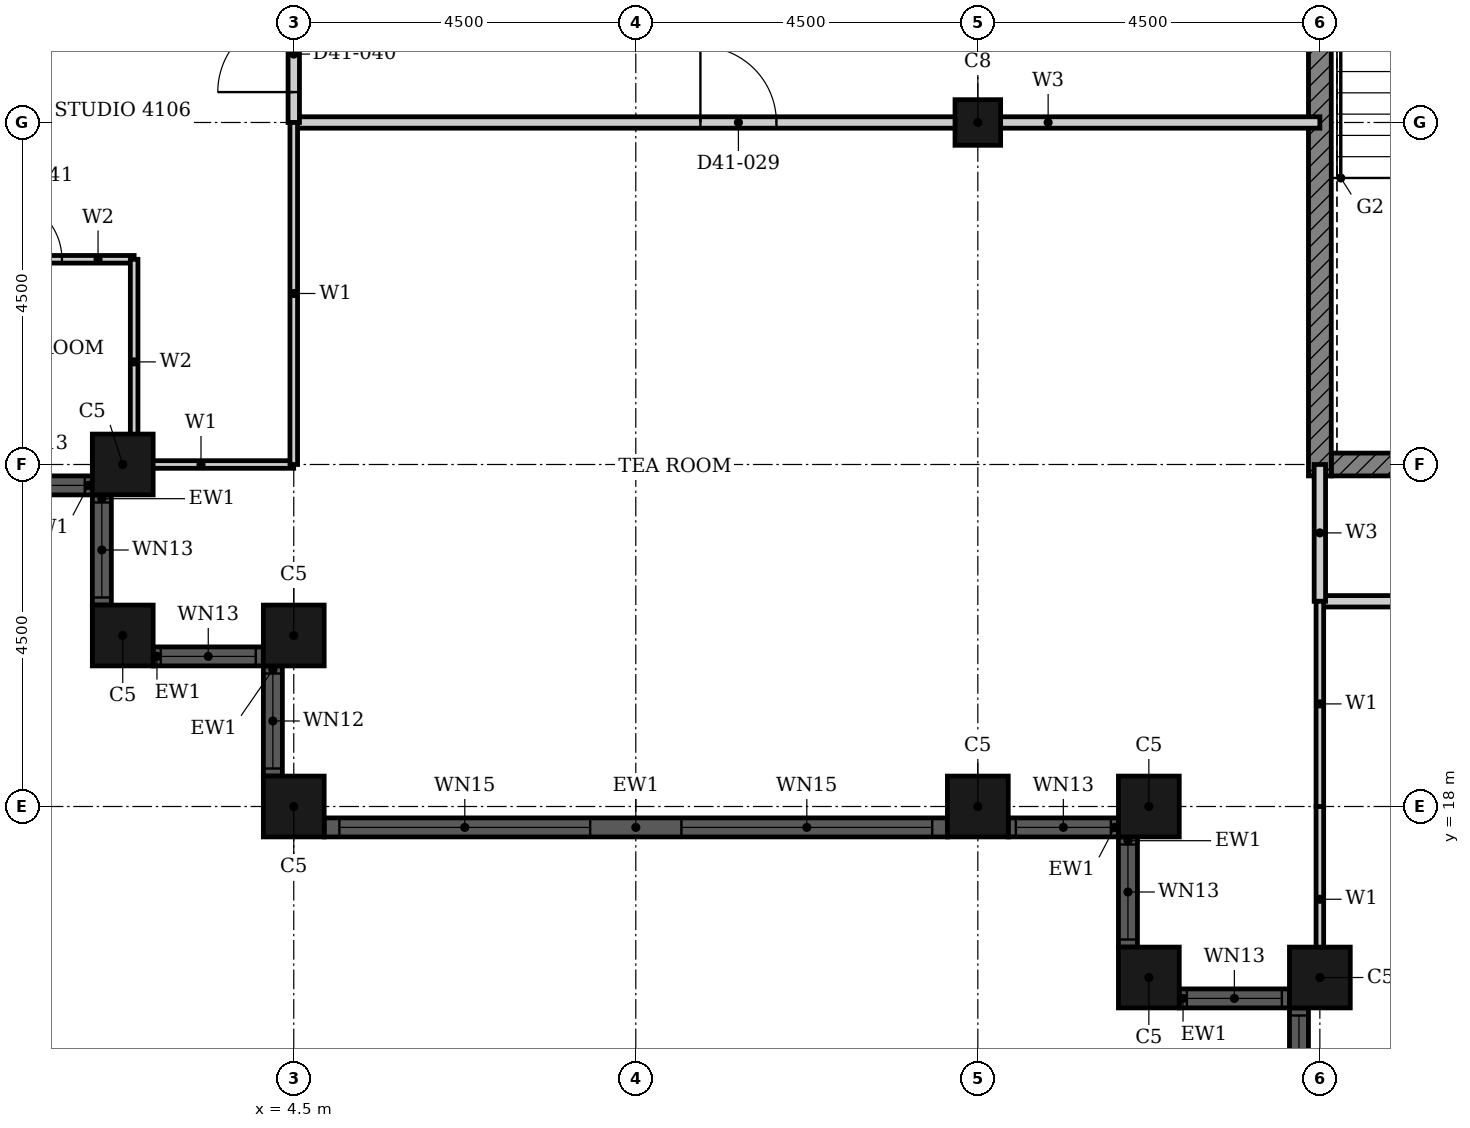
"""IFC4 building model, lengths in metres.
Left out: names, types, materials, properties, quantities, classifications, styles, units other than length and angle.
Written with IfcOpenShell. Run it as: python <this file> out.ifc"""

import sys

from ifc_helpers import new_model, si_unit, direction, frame, frame_2d, origin, origin_2d, place, context, subcontext, project, spatial, rectangle, hollow_rectangle, extrude, element, fill, save


model = new_model("IFC4")
c1 = context("Model", 3, precision=1e-05, world=origin(), true_north=direction((0.0, 1.0)))
c2 = subcontext(c1, "Body", "Model", "MODEL_VIEW")
j1 = project(units=[si_unit("LENGTHUNIT", "METRE"), si_unit("PLANEANGLEUNIT", "RADIAN")], contexts=[c1])
p1 = place(None, origin())
s1 = spatial("IfcSite", under=j1, at=p1, CompositionType="ELEMENT")
p2 = place(p1, origin())
s2 = spatial("IfcBuilding", under=s1, at=p2, CompositionType="ELEMENT")
p3 = place(p2, frame((0.0, 0.0, 165.4)))
s3 = spatial("IfcBuildingStorey", under=s2, at=p3, CompositionType="ELEMENT", Elevation=165.4)
for number, where, z_axis, x_axis in (
    (1, (2.25, 22.5, 0.0), (0.0, 0.0, 1.0), (1.0, 0.0, 0.0)),
    (2, (2.25, 20.25, 0.0), (0.0, 0.0, 1.0), (1.0, 0.0, 0.0)),
    (3, (4.5, 20.25, 0.0), (0.0, 0.0, 1.0), (1.0, 0.0, 0.0)),
    (4, (4.5, 18.0, 0.0), (0.0, 0.0, 1.0), (1.0, 0.0, 0.0)),
    (5, (13.5, 18.0, 0.0), (0.0, 0.0, 1.0), (1.0, 0.0, 0.0)),
    (6, (15.75, 18.0, 0.0), (0.0, 0.0, 1.0), (1.0, 0.0, 0.0)),
    (7, (15.75, 15.75, 0.0), (0.0, 0.0, 1.0), (1.0, 0.0, 0.0)),
    (8, (18.0, 15.75, 0.0), (0.0, 0.0, 1.0), (1.0, 0.0, 0.0)),
):
    element("IfcColumn", number, at=place(p3, frame(where, z_axis=z_axis, x_axis=x_axis)), inside=s3, PredefinedType="COLUMN", context=c2, shape_type="SweptSolid", body=[
        extrude(hollow_rectangle(XDim=0.8, YDim=0.8, WallThickness=0.025, at=origin_2d()), origin(), (0.0, 0.0, 1.0), 3.7),
    ])
p4 = place(p3, frame((13.5, 27.0, 0.0), z_axis=(0.0, 0.0, 1.0), x_axis=(1.0, 0.0, 0.0)))
e9 = element("IfcColumn", 9, at=p4, inside=s3, PredefinedType="COLUMN", context=c2, shape_type="SweptSolid", body=[
    extrude(hollow_rectangle(XDim=0.6, YDim=0.6, WallThickness=0.02, at=origin_2d()), origin(), (0.0, 0.0, 1.0), 3.7),
])
p5 = place(p3, frame((0.4, 22.225, 0.0), z_axis=(0.0, 0.0, 1.0), x_axis=(1.0, 0.0, 0.0)))
e10 = element("IfcWall", 10, at=p5, inside=s3, PredefinedType="SOLIDWALL", context=c2, shape_type="SweptSolid", body=[
    extrude(rectangle(XDim=1.45, YDim=0.25, at=frame_2d((0.725, 0.0))), origin(), (0.0, 0.0, 1.0), 3.7),
])
p6 = place(p5, frame((0.1, 0.0, 0.9)))
e11 = element("IfcOpeningElement", 11, at=p6, cuts=e10, PredefinedType="OPENING", context=c2, shape_type="SweptSolid", body=[
    extrude(rectangle(XDim=1.25, YDim=1.85, at=frame_2d((0.625, 0.925))), frame((0.0, 0.135, 0.0), z_axis=(0.0, -1.0, 0.0), x_axis=(1.0, 0.0, 0.0)), (0.0, 0.0, 1.0), 0.27),
])
p7 = place(p3, frame((1.975, 22.1, 0.0), z_axis=(0.0, 0.0, 1.0), x_axis=(0.0, -1.0, 0.0)))
e12 = element("IfcWall", 12, at=p7, inside=s3, PredefinedType="SOLIDWALL", context=c2, shape_type="SweptSolid", body=[
    extrude(rectangle(XDim=1.45, YDim=0.25, at=frame_2d((0.725, 0.0))), origin(), (0.0, 0.0, 1.0), 3.7),
])
p8 = place(p7, frame((0.1, 0.0, 0.9)))
e13 = element("IfcOpeningElement", 13, at=p8, cuts=e12, PredefinedType="OPENING", context=c2, shape_type="SweptSolid", body=[
    extrude(rectangle(XDim=1.25, YDim=1.85, at=frame_2d((0.625, 0.925))), frame((0.0, 0.135, 0.0), z_axis=(0.0, -1.0, 0.0), x_axis=(1.0, 0.0, 0.0)), (0.0, 0.0, 1.0), 0.27),
])
p9 = place(p3, frame((2.65, 19.975, 0.0), z_axis=(0.0, 0.0, 1.0), x_axis=(1.0, 0.0, 0.0)))
e14 = element("IfcWall", 14, at=p9, inside=s3, PredefinedType="SOLIDWALL", context=c2, shape_type="SweptSolid", body=[
    extrude(rectangle(XDim=1.45, YDim=0.25, at=frame_2d((0.725, 0.0))), origin(), (0.0, 0.0, 1.0), 3.7),
])
p10 = place(p9, frame((0.1, 0.0, 0.9)))
e15 = element("IfcOpeningElement", 15, at=p10, cuts=e14, PredefinedType="OPENING", context=c2, shape_type="SweptSolid", body=[
    extrude(rectangle(XDim=1.25, YDim=1.85, at=frame_2d((0.625, 0.925))), frame((0.0, 0.135, 0.0), z_axis=(0.0, -1.0, 0.0), x_axis=(1.0, 0.0, 0.0)), (0.0, 0.0, 1.0), 0.27),
])
p11 = place(p3, frame((4.225, 19.85, 0.0), z_axis=(0.0, 0.0, 1.0), x_axis=(0.0, -1.0, 0.0)))
e16 = element("IfcWall", 16, at=p11, inside=s3, PredefinedType="SOLIDWALL", context=c2, shape_type="SweptSolid", body=[
    extrude(rectangle(XDim=1.45, YDim=0.25, at=frame_2d((0.725, 0.0))), origin(), (0.0, 0.0, 1.0), 3.7),
])
p12 = place(p11, frame((0.1, 0.0, 0.9)))
e17 = element("IfcOpeningElement", 17, at=p12, cuts=e16, PredefinedType="OPENING", context=c2, shape_type="SweptSolid", body=[
    extrude(rectangle(XDim=1.25, YDim=2.08, at=frame_2d((0.625, 1.04))), frame((0.0, 0.135, 0.0), z_axis=(0.0, -1.0, 0.0), x_axis=(1.0, 0.0, 0.0)), (0.0, 0.0, 1.0), 0.27),
])
p13 = place(p3, frame((4.9, 17.725, 0.0), z_axis=(0.0, 0.0, 1.0), x_axis=(1.0, 0.0, 0.0)))
e18 = element("IfcWall", 18, at=p13, inside=s3, PredefinedType="SOLIDWALL", context=c2, shape_type="SweptSolid", body=[
    extrude(rectangle(XDim=8.2, YDim=0.25, at=frame_2d((4.1, 0.0))), origin(), (0.0, 0.0, 1.0), 3.7),
])
p14 = place(p13, frame((0.2, 0.0, 0.45)))
e19 = element("IfcOpeningElement", 19, at=p14, cuts=e18, PredefinedType="OPENING", context=c2, shape_type="SweptSolid", body=[
    extrude(rectangle(XDim=3.3, YDim=2.3, at=frame_2d((1.65, 1.15))), frame((0.0, 0.135, 0.0), z_axis=(0.0, -1.0, 0.0), x_axis=(1.0, 0.0, 0.0)), (0.0, 0.0, 1.0), 0.27),
])
p15 = place(p13, frame((4.7, 0.0, 0.45)))
e20 = element("IfcOpeningElement", 20, at=p15, cuts=e18, PredefinedType="OPENING", context=c2, shape_type="SweptSolid", body=[
    extrude(rectangle(XDim=3.3, YDim=2.3, at=frame_2d((1.65, 1.15))), frame((0.0, 0.135, 0.0), z_axis=(0.0, -1.0, 0.0), x_axis=(1.0, 0.0, 0.0)), (0.0, 0.0, 1.0), 0.27),
])
p16 = place(p3, frame((13.9, 17.725, 0.0), z_axis=(0.0, 0.0, 1.0), x_axis=(1.0, 0.0, 0.0)))
e21 = element("IfcWall", 21, at=p16, inside=s3, PredefinedType="SOLIDWALL", context=c2, shape_type="SweptSolid", body=[
    extrude(rectangle(XDim=1.45, YDim=0.25, at=frame_2d((0.725, 0.0))), origin(), (0.0, 0.0, 1.0), 3.7),
])
p17 = place(p16, frame((0.1, 0.0, 0.9)))
e22 = element("IfcOpeningElement", 22, at=p17, cuts=e21, PredefinedType="OPENING", context=c2, shape_type="SweptSolid", body=[
    extrude(rectangle(XDim=1.25, YDim=1.85, at=frame_2d((0.625, 0.925))), frame((0.0, 0.135, 0.0), z_axis=(0.0, -1.0, 0.0), x_axis=(1.0, 0.0, 0.0)), (0.0, 0.0, 1.0), 0.27),
])
p18 = place(p3, frame((15.475, 17.6, 0.0), z_axis=(0.0, 0.0, 1.0), x_axis=(0.0, -1.0, 0.0)))
e23 = element("IfcWall", 23, at=p18, inside=s3, PredefinedType="SOLIDWALL", context=c2, shape_type="SweptSolid", body=[
    extrude(rectangle(XDim=1.45, YDim=0.25, at=frame_2d((0.725, 0.0))), origin(), (0.0, 0.0, 1.0), 3.7),
])
p19 = place(p18, frame((0.1, 0.0, 0.9)))
e24 = element("IfcOpeningElement", 24, at=p19, cuts=e23, PredefinedType="OPENING", context=c2, shape_type="SweptSolid", body=[
    extrude(rectangle(XDim=1.25, YDim=1.85, at=frame_2d((0.625, 0.925))), frame((0.0, 0.135, 0.0), z_axis=(0.0, -1.0, 0.0), x_axis=(1.0, 0.0, 0.0)), (0.0, 0.0, 1.0), 0.27),
])
p20 = place(p3, frame((16.15, 15.475, 0.0), z_axis=(0.0, 0.0, 1.0), x_axis=(1.0, 0.0, 0.0)))
e25 = element("IfcWall", 25, at=p20, inside=s3, PredefinedType="SOLIDWALL", context=c2, shape_type="SweptSolid", body=[
    extrude(rectangle(XDim=1.45, YDim=0.25, at=frame_2d((0.725, 0.0))), origin(), (0.0, 0.0, 1.0), 3.7),
])
p21 = place(p20, frame((0.1, 0.0, 0.9)))
e26 = element("IfcOpeningElement", 26, at=p21, cuts=e25, PredefinedType="OPENING", context=c2, shape_type="SweptSolid", body=[
    extrude(rectangle(XDim=1.25, YDim=1.85, at=frame_2d((0.625, 0.925))), frame((0.0, 0.135, 0.0), z_axis=(0.0, -1.0, 0.0), x_axis=(1.0, 0.0, 0.0)), (0.0, 0.0, 1.0), 0.27),
])
p22 = place(p3, frame((17.725, 15.35, 0.0), z_axis=(0.0, 0.0, 1.0), x_axis=(0.0, -1.0, 0.0)))
e27 = element("IfcWall", 27, at=p22, inside=s3, PredefinedType="SOLIDWALL", context=c2, shape_type="SweptSolid", body=[
    extrude(rectangle(XDim=1.45, YDim=0.25, at=frame_2d((0.725, 0.0))), origin(), (0.0, 0.0, 1.0), 3.7),
])
p23 = place(p22, frame((0.1, 0.0, 0.9)))
e28 = element("IfcOpeningElement", 28, at=p23, cuts=e27, PredefinedType="OPENING", context=c2, shape_type="SweptSolid", body=[
    extrude(rectangle(XDim=1.25, YDim=1.85, at=frame_2d((0.625, 0.925))), frame((0.0, 0.135, 0.0), z_axis=(0.0, -1.0, 0.0), x_axis=(1.0, 0.0, 0.0)), (0.0, 0.0, 1.0), 0.27),
])
p24 = place(p3, frame((18.15, 22.5, 0.0), z_axis=(0.0, 0.0, 1.0), x_axis=(1.0, 0.0, 0.0)))
e29 = element("IfcWall", 29, at=p24, inside=s3, PredefinedType="SHEAR", context=c2, shape_type="SweptSolid", body=[
    extrude(rectangle(XDim=4.225, YDim=0.3, at=frame_2d((2.113, 0.0))), origin(), (0.0, 0.0, 1.0), 3.4),
])
p25 = place(p3, frame((18.0, 22.35, 0.0), z_axis=(0.0, 0.0, 1.0), x_axis=(0.0, 1.0, 0.0)))
e30 = element("IfcWall", 30, at=p25, inside=s3, PredefinedType="SHEAR", context=c2, shape_type="SweptSolid", body=[
    extrude(rectangle(XDim=9.3, YDim=0.3, at=frame_2d((4.65, 0.0))), origin(), (0.0, 0.0, 1.0), 3.4),
])
p26 = place(p3, frame((18.0, 20.7, 0.0), z_axis=(0.0, 0.0, 1.0), x_axis=(1.0, 0.0, 0.0)))
e31 = element("IfcWall", 31, at=p26, inside=s3, PredefinedType="PARTITIONING", context=c2, shape_type="SweptSolid", body=[
    extrude(rectangle(XDim=13.5, YDim=0.15, at=frame_2d((6.75, 0.0))), origin(), (0.0, 0.0, 1.0), 3.4),
])
p27 = place(p26, frame((6.25, 0.0, 0.0)))
e32 = element("IfcOpeningElement", 32, at=p27, cuts=e31, PredefinedType="OPENING", context=c2, shape_type="SweptSolid", body=[
    extrude(rectangle(XDim=1.0, YDim=2.1, at=frame_2d((0.5, 1.05))), frame((0.0, 0.085, 0.0), z_axis=(0.0, -1.0, 0.0), x_axis=(1.0, 0.0, 0.0)), (0.0, 0.0, 1.0), 0.17),
])
p28 = place(p3, frame((4.5, 27.0, 0.0), z_axis=(0.0, 0.0, 1.0), x_axis=(1.0, 0.0, 0.0)))
e33 = element("IfcWall", 33, at=p28, inside=s3, PredefinedType="PARTITIONING", context=c2, shape_type="SweptSolid", body=[
    extrude(rectangle(XDim=13.5, YDim=0.15, at=frame_2d((6.75, 0.0))), origin(), (0.0, 0.0, 1.0), 2.68),
])
p29 = place(p28, frame((5.35, 0.0, 0.0)))
e34 = element("IfcOpeningElement", 34, at=p29, cuts=e33, PredefinedType="OPENING", context=c2, shape_type="SweptSolid", body=[
    extrude(rectangle(XDim=1.0, YDim=2.1, at=frame_2d((0.5, 1.05))), frame((0.0, 0.085, 0.0), z_axis=(0.0, -1.0, 0.0), x_axis=(1.0, 0.0, 0.0)), (0.0, 0.0, 1.0), 0.17),
])
p30 = place(p3, frame((18.0, 20.7, 0.0), z_axis=(0.0, 0.0, 1.0), x_axis=(0.0, 1.0, 0.0)))
e35 = element("IfcWall", 35, at=p30, inside=s3, PredefinedType="PARTITIONING", context=c2, shape_type="SweptSolid", body=[
    extrude(rectangle(XDim=1.8, YDim=0.15, at=frame_2d((0.9, 0.0))), origin(), (0.0, 0.0, 1.0), 3.4),
])
p31 = place(p3, frame((4.5, 27.0, 0.0), z_axis=(0.0, 0.0, 1.0), x_axis=(0.0, 1.0, 0.0)))
e36 = element("IfcWall", 36, at=p31, inside=s3, PredefinedType="PARTITIONING", context=c2, shape_type="SweptSolid", body=[
    extrude(rectangle(XDim=1.8, YDim=0.15, at=frame_2d((0.9, 0.0))), origin(), (0.0, 0.0, 1.0), 3.4),
])
p32 = place(p31, frame((0.4, 0.0, 0.0)))
e37 = element("IfcOpeningElement", 37, at=p32, cuts=e36, PredefinedType="OPENING", context=c2, shape_type="SweptSolid", body=[
    extrude(rectangle(XDim=1.0, YDim=2.2, at=frame_2d((0.5, 1.1))), frame((0.0, 0.085, 0.0), z_axis=(0.0, -1.0, 0.0), x_axis=(1.0, 0.0, 0.0)), (0.0, 0.0, 1.0), 0.17),
])
p33 = place(p3, frame((2.06, 22.5, 0.0), z_axis=(0.0, 0.0, 1.0), x_axis=(1.0, 0.0, 0.0)))
e38 = element("IfcWall", 38, at=p33, inside=s3, PredefinedType="PARTITIONING", context=c2, shape_type="SweptSolid", body=[
    extrude(rectangle(XDim=2.439, YDim=0.1, at=frame_2d((1.219, 0.0))), origin(), (0.0, 0.0, 1.0), 2.68),
])
p34 = place(p3, frame((18.0, 15.56, 0.0), z_axis=(0.0, 0.0, 1.0), x_axis=(0.0, 1.0, 0.0)))
e39 = element("IfcWall", 39, at=p34, inside=s3, PredefinedType="PARTITIONING", context=c2, shape_type="SweptSolid", body=[
    extrude(rectangle(XDim=2.439, YDim=0.1, at=frame_2d((1.219, 0.0))), origin(), (0.0, 0.0, 1.0), 3.4),
])
p35 = place(p3, frame((18.0, 18.0, 0.0), z_axis=(0.0, 0.0, 1.0), x_axis=(0.0, 1.0, 0.0)))
e40 = element("IfcWall", 40, at=p35, inside=s3, PredefinedType="PARTITIONING", context=c2, shape_type="SweptSolid", body=[
    extrude(rectangle(XDim=2.7, YDim=0.1, at=frame_2d((1.35, 0.0))), origin(), (0.0, 0.0, 1.0), 3.4),
])
p36 = place(p3, frame((4.5, 22.5, 0.0), z_axis=(0.0, 0.0, 1.0), x_axis=(0.0, 1.0, 0.0)))
e41 = element("IfcWall", 41, at=p36, inside=s3, PredefinedType="PARTITIONING", context=c2, shape_type="SweptSolid", body=[
    extrude(rectangle(XDim=4.5, YDim=0.1, at=frame_2d((2.25, 0.0))), origin(), (0.0, 0.0, 1.0), 3.4),
])
p37 = place(p3, frame((-0.15, 25.2, 0.0), z_axis=(0.0, 0.0, 1.0), x_axis=(1.0, 0.0, 0.0)))
e42 = element("IfcWall", 42, at=p37, inside=s3, PredefinedType="PARTITIONING", context=c2, shape_type="SweptSolid", body=[
    extrude(rectangle(XDim=2.55, YDim=0.1, at=frame_2d((1.275, 0.0))), origin(), (0.0, 0.0, 1.0), 3.4),
])
p38 = place(p37, frame((0.8, 0.0, 0.0)))
e43 = element("IfcOpeningElement", 43, at=p38, cuts=e42, PredefinedType="OPENING", context=c2, shape_type="SweptSolid", body=[
    extrude(rectangle(XDim=0.8, YDim=2.1, at=frame_2d((0.4, 1.05))), frame((0.0, 0.06, 0.0), z_axis=(0.0, -1.0, 0.0), x_axis=(1.0, 0.0, 0.0)), (0.0, 0.0, 1.0), 0.12),
])
p39 = place(p3, frame((2.4, 22.5, 0.0), z_axis=(0.0, 0.0, 1.0), x_axis=(0.0, 1.0, 0.0)))
e44 = element("IfcWall", 44, at=p39, inside=s3, PredefinedType="PARTITIONING", context=c2, shape_type="SweptSolid", body=[
    extrude(rectangle(XDim=2.7, YDim=0.1, at=frame_2d((1.35, 0.0))), origin(), (0.0, 0.0, 1.0), 3.4),
])
p40 = place(p6, origin())
e45 = element("IfcWindow", 45, at=p40, inside=s3, PartitioningType="SINGLE_PANEL", PredefinedType="WINDOW", context=c2, shape_type="SweptSolid", body=[
    extrude(rectangle(XDim=1.25, YDim=1.85, at=frame_2d((0.625, 0.925))), frame((0.0, 0.03, 0.0), z_axis=(0.0, -1.0, 0.0), x_axis=(1.0, 0.0, 0.0)), (0.0, 0.0, 1.0), 0.06),
])
fill(e11, e45)
p41 = place(p8, origin())
e46 = element("IfcWindow", 46, at=p41, inside=s3, PartitioningType="SINGLE_PANEL", PredefinedType="WINDOW", context=c2, shape_type="SweptSolid", body=[
    extrude(rectangle(XDim=1.25, YDim=1.85, at=frame_2d((0.625, 0.925))), frame((0.0, 0.03, 0.0), z_axis=(0.0, -1.0, 0.0), x_axis=(1.0, 0.0, 0.0)), (0.0, 0.0, 1.0), 0.06),
])
fill(e13, e46)
p42 = place(p10, origin())
e47 = element("IfcWindow", 47, at=p42, inside=s3, PartitioningType="SINGLE_PANEL", PredefinedType="WINDOW", context=c2, shape_type="SweptSolid", body=[
    extrude(rectangle(XDim=1.25, YDim=1.85, at=frame_2d((0.625, 0.925))), frame((0.0, 0.03, 0.0), z_axis=(0.0, -1.0, 0.0), x_axis=(1.0, 0.0, 0.0)), (0.0, 0.0, 1.0), 0.06),
])
fill(e15, e47)
p43 = place(p12, origin())
e48 = element("IfcWindow", 48, at=p43, inside=s3, PartitioningType="SINGLE_PANEL", PredefinedType="WINDOW", context=c2, shape_type="SweptSolid", body=[
    extrude(rectangle(XDim=1.25, YDim=2.08, at=frame_2d((0.625, 1.04))), frame((0.0, 0.03, 0.0), z_axis=(0.0, -1.0, 0.0), x_axis=(1.0, 0.0, 0.0)), (0.0, 0.0, 1.0), 0.06),
])
fill(e17, e48)
p44 = place(p14, origin())
e49 = element("IfcWindow", 49, at=p44, inside=s3, PartitioningType="SINGLE_PANEL", PredefinedType="WINDOW", context=c2, shape_type="SweptSolid", body=[
    extrude(rectangle(XDim=3.3, YDim=2.3, at=frame_2d((1.65, 1.15))), frame((0.0, 0.03, 0.0), z_axis=(0.0, -1.0, 0.0), x_axis=(1.0, 0.0, 0.0)), (0.0, 0.0, 1.0), 0.06),
])
fill(e19, e49)
p45 = place(p15, origin())
e50 = element("IfcWindow", 50, at=p45, inside=s3, PartitioningType="SINGLE_PANEL", PredefinedType="WINDOW", context=c2, shape_type="SweptSolid", body=[
    extrude(rectangle(XDim=3.3, YDim=2.3, at=frame_2d((1.65, 1.15))), frame((0.0, 0.03, 0.0), z_axis=(0.0, -1.0, 0.0), x_axis=(1.0, 0.0, 0.0)), (0.0, 0.0, 1.0), 0.06),
])
fill(e20, e50)
p46 = place(p17, origin())
e51 = element("IfcWindow", 51, at=p46, inside=s3, PartitioningType="SINGLE_PANEL", PredefinedType="WINDOW", context=c2, shape_type="SweptSolid", body=[
    extrude(rectangle(XDim=1.25, YDim=1.85, at=frame_2d((0.625, 0.925))), frame((0.0, 0.03, 0.0), z_axis=(0.0, -1.0, 0.0), x_axis=(1.0, 0.0, 0.0)), (0.0, 0.0, 1.0), 0.06),
])
fill(e22, e51)
p47 = place(p19, origin())
e52 = element("IfcWindow", 52, at=p47, inside=s3, PartitioningType="SINGLE_PANEL", PredefinedType="WINDOW", context=c2, shape_type="SweptSolid", body=[
    extrude(rectangle(XDim=1.25, YDim=1.85, at=frame_2d((0.625, 0.925))), frame((0.0, 0.03, 0.0), z_axis=(0.0, -1.0, 0.0), x_axis=(1.0, 0.0, 0.0)), (0.0, 0.0, 1.0), 0.06),
])
fill(e24, e52)
p48 = place(p21, origin())
e53 = element("IfcWindow", 53, at=p48, inside=s3, PartitioningType="SINGLE_PANEL", PredefinedType="WINDOW", context=c2, shape_type="SweptSolid", body=[
    extrude(rectangle(XDim=1.25, YDim=1.85, at=frame_2d((0.625, 0.925))), frame((0.0, 0.03, 0.0), z_axis=(0.0, -1.0, 0.0), x_axis=(1.0, 0.0, 0.0)), (0.0, 0.0, 1.0), 0.06),
])
fill(e26, e53)
p49 = place(p23, origin())
e54 = element("IfcWindow", 54, at=p49, inside=s3, PartitioningType="SINGLE_PANEL", PredefinedType="WINDOW", context=c2, shape_type="SweptSolid", body=[
    extrude(rectangle(XDim=1.25, YDim=1.85, at=frame_2d((0.625, 0.925))), frame((0.0, 0.03, 0.0), z_axis=(0.0, -1.0, 0.0), x_axis=(1.0, 0.0, 0.0)), (0.0, 0.0, 1.0), 0.06),
])
fill(e28, e54)
p50 = place(p29, origin())
e55 = element("IfcDoor", 55, at=p50, inside=s3, OperationType="SINGLE_SWING_LEFT", PredefinedType="DOOR", context=c2, shape_type="SweptSolid", body=[
    extrude(rectangle(XDim=1.0, YDim=2.1, at=frame_2d((0.5, 1.05))), frame((0.0, 0.025, 0.0), z_axis=(0.0, -1.0, 0.0), x_axis=(1.0, 0.0, 0.0)), (0.0, 0.0, 1.0), 0.05),
])
fill(e34, e55)
p51 = place(p32, origin())
e56 = element("IfcDoor", 56, at=p51, inside=s3, OperationType="SINGLE_SWING_LEFT", PredefinedType="DOOR", context=c2, shape_type="SweptSolid", body=[
    extrude(rectangle(XDim=1.0, YDim=2.2, at=frame_2d((0.5, 1.1))), frame((0.0, 0.025, 0.0), z_axis=(0.0, -1.0, 0.0), x_axis=(1.0, 0.0, 0.0)), (0.0, 0.0, 1.0), 0.05),
])
fill(e37, e56)
p52 = place(p38, origin())
e57 = element("IfcDoor", 57, at=p52, inside=s3, OperationType="SINGLE_SWING_LEFT", PredefinedType="DOOR", context=c2, shape_type="SweptSolid", body=[
    extrude(rectangle(XDim=0.8, YDim=2.1, at=frame_2d((0.4, 1.05))), frame((0.0, 0.025, 0.0), z_axis=(0.0, -1.0, 0.0), x_axis=(1.0, 0.0, 0.0)), (0.0, 0.0, 1.0), 0.05),
])
fill(e43, e57)
save(model, sys.argv[1])
